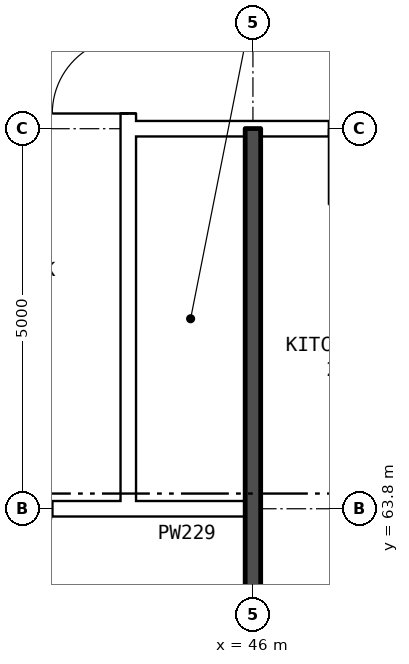
"""IFC4 building model, lengths in metres.
Left out: names, types, materials, properties, quantities, classifications, styles, units other than length and angle.
Written with IfcOpenShell. Run it as: python <this file> out.ifc"""

import sys

from ifc_helpers import new_model, si_unit, direction, frame, frame_2d, origin, place, context, subcontext, project, spatial, rectangle, extrude, element, fill, save


model = new_model("IFC4")
c1 = context("Model", 3, precision=1e-05, world=origin(), true_north=direction((0.0, 1.0)))
c2 = subcontext(c1, "Body", "Model", "MODEL_VIEW")
j1 = project(units=[si_unit("LENGTHUNIT", "METRE"), si_unit("PLANEANGLEUNIT", "RADIAN")], contexts=[c1])
p1 = place(None, origin())
s1 = spatial("IfcSite", under=j1, at=p1, CompositionType="ELEMENT")
p2 = place(p1, origin())
s2 = spatial("IfcBuilding", under=s1, at=p2, CompositionType="ELEMENT")
p3 = place(p2, frame((0.0, 0.0, 205.9)))
s3 = spatial("IfcBuildingStorey", under=s2, at=p3, CompositionType="ELEMENT", Elevation=205.9)
p4 = place(p3, frame((44.36, 63.9, 0.0), z_axis=(0.0, 0.0, 1.0), x_axis=(0.0, 1.0, 0.0)))
e1 = element("IfcWall", 1, at=p4, inside=s3, PredefinedType="PARTITIONING", context=c2, shape_type="SweptSolid", body=[
    extrude(rectangle(XDim=12.2, YDim=0.2, at=frame_2d((6.1, 0.0))), origin(), (0.0, 0.0, 1.0), 2.85),
])
p5 = place(p4, frame((5.1, 0.0, 0.0)))
e2 = element("IfcOpeningElement", 2, at=p5, cuts=e1, PredefinedType="OPENING", context=c2, shape_type="SweptSolid", body=[
    extrude(rectangle(XDim=2.0, YDim=2.1, at=frame_2d((1.0, 1.05))), frame((0.0, 0.11, 0.0), z_axis=(0.0, -1.0, 0.0), x_axis=(1.0, 0.0, 0.0)), (0.0, 0.0, 1.0), 0.22),
])
p6 = place(p3, frame((41.36, 63.8, 0.0), z_axis=(0.0, 0.0, 1.0), x_axis=(1.0, 0.0, 0.0)))
e3 = element("IfcWall", 3, at=p6, inside=s3, PredefinedType="PARTITIONING", context=c2, shape_type="SweptSolid", body=[
    extrude(rectangle(XDim=3.0, YDim=0.2, at=frame_2d((1.5, 0.0))), origin(), (0.0, 0.0, 1.0), 2.85),
])
p7 = place(p6, frame((1.0, 0.0, 0.0)))
e4 = element("IfcOpeningElement", 4, at=p7, cuts=e3, PredefinedType="OPENING", context=c2, shape_type="SweptSolid", body=[
    extrude(rectangle(XDim=1.0, YDim=2.1, at=frame_2d((0.5, 1.05))), frame((0.0, 0.11, 0.0), z_axis=(0.0, -1.0, 0.0), x_axis=(1.0, 0.0, 0.0)), (0.0, 0.0, 1.0), 0.22),
])
p8 = place(p3, frame((44.36, 63.8, 0.0), z_axis=(0.0, 0.0, 1.0), x_axis=(1.0, 0.0, 0.0)))
e5 = element("IfcWall", 5, at=p8, inside=s3, PredefinedType="PARTITIONING", context=c2, shape_type="SweptSolid", body=[
    extrude(rectangle(XDim=1.54, YDim=0.2, at=frame_2d((0.77, 0.0))), origin(), (0.0, 0.0, 1.0), 2.85),
])
p9 = place(p3, frame((44.36, 68.8, 0.0), z_axis=(0.0, 0.0, 1.0), x_axis=(1.0, 0.0, 0.0)))
e6 = element("IfcWall", 6, at=p9, inside=s3, PredefinedType="PARTITIONING", context=c2, shape_type="SweptSolid", body=[
    extrude(rectangle(XDim=19.28, YDim=0.2, at=frame_2d((9.64, 0.0))), origin(), (0.0, 0.0, 1.0), 2.85),
])
p10 = place(p9, frame((14.64, 0.0, 0.0)))
e7 = element("IfcOpeningElement", 7, at=p10, cuts=e6, PredefinedType="OPENING", context=c2, shape_type="SweptSolid", body=[
    extrude(rectangle(XDim=1.0, YDim=2.1, at=frame_2d((0.5, 1.05))), frame((0.0, 0.11, 0.0), z_axis=(0.0, -1.0, 0.0), x_axis=(1.0, 0.0, 0.0)), (0.0, 0.0, 1.0), 0.22),
])
p11 = place(p9, frame((8.64, 0.0, 0.0)))
e8 = element("IfcOpeningElement", 8, at=p11, cuts=e6, PredefinedType="OPENING", context=c2, shape_type="SweptSolid", body=[
    extrude(rectangle(XDim=1.0, YDim=2.1, at=frame_2d((0.5, 1.05))), frame((0.0, 0.11, 0.0), z_axis=(0.0, -1.0, 0.0), x_axis=(1.0, 0.0, 0.0)), (0.0, 0.0, 1.0), 0.22),
])
p12 = place(p9, frame((2.64, 0.0, 0.0)))
e9 = element("IfcOpeningElement", 9, at=p12, cuts=e6, PredefinedType="OPENING", context=c2, shape_type="SweptSolid", body=[
    extrude(rectangle(XDim=1.0, YDim=2.1, at=frame_2d((0.5, 1.05))), frame((0.0, 0.11, 0.0), z_axis=(0.0, -1.0, 0.0), x_axis=(1.0, 0.0, 0.0)), (0.0, 0.0, 1.0), 0.22),
])
p13 = place(p3, frame((46.0, 54.36, 0.0), z_axis=(0.0, 0.0, 1.0), x_axis=(0.0, 1.0, 0.0)))
e10 = element("IfcWall", 10, at=p13, inside=s3, PredefinedType="SOLIDWALL", context=c2, shape_type="SweptSolid", body=[
    extrude(rectangle(XDim=14.44, YDim=0.2, at=frame_2d((7.22, 0.0))), origin(), (0.0, 0.0, 1.0), 2.85),
])
p14 = place(p5, origin())
e11 = element("IfcDoor", 11, at=p14, inside=s3, OperationType="DOUBLE_DOOR_SINGLE_SWING", PredefinedType="DOOR", context=c2, shape_type="SweptSolid", body=[
    extrude(rectangle(XDim=2.0, YDim=2.1, at=frame_2d((1.0, 1.05))), frame((0.0, 0.025, 0.0), z_axis=(0.0, -1.0, 0.0), x_axis=(1.0, 0.0, 0.0)), (0.0, 0.0, 1.0), 0.05),
])
fill(e2, e11)
save(model, sys.argv[1])
